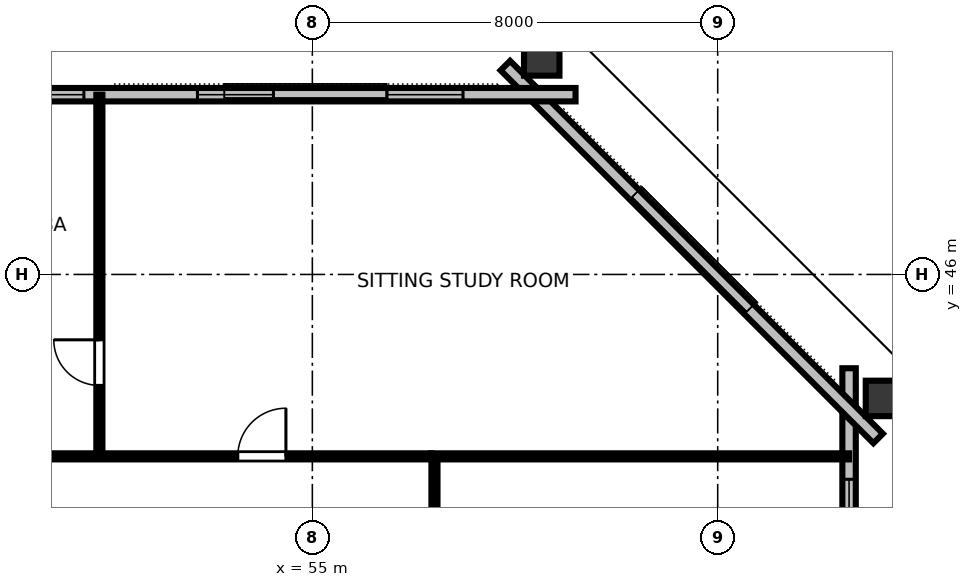
"""IFC4 building model, lengths in metres.
Left out: names, types, materials, properties, quantities, classifications, styles, units other than length and angle.
Written with IfcOpenShell. Run it as: python <this file> out.ifc"""

import sys

from ifc_helpers import new_model, si_unit, direction, frame, frame_2d, origin, origin_2d, place, context, subcontext, project, spatial, rectangle, hollow_rectangle, extrude, element, fill, save


model = new_model("IFC4")
c1 = context("Model", 3, precision=1e-05, world=origin(), true_north=direction((0.0, 1.0)))
c2 = subcontext(c1, "Body", "Model", "MODEL_VIEW")
j1 = project(units=[si_unit("LENGTHUNIT", "METRE"), si_unit("PLANEANGLEUNIT", "RADIAN")], contexts=[c1])
p1 = place(None, origin())
s1 = spatial("IfcSite", under=j1, at=p1, CompositionType="ELEMENT")
p2 = place(p1, origin())
s2 = spatial("IfcBuilding", under=s1, at=p2, CompositionType="ELEMENT")
p3 = place(p2, frame((0.0, 0.0, 220.2)))
s3 = spatial("IfcBuildingStorey", under=s2, at=p3, CompositionType="ELEMENT", Elevation=220.2)
for number, where, z_axis, x_axis in (
    (1, (66.347, 43.554, 0.0), (0.0, 0.0, 1.0), (0.0, 1.0, 0.0)),
    (2, (59.527, 50.348, 0.0), (0.0, 0.0, 1.0), (1.0, 0.0, 0.0)),
):
    element("IfcColumn", number, at=place(p3, frame(where, z_axis=z_axis, x_axis=x_axis)), inside=s3, PredefinedType="COLUMN", context=c2, shape_type="SweptSolid", body=[
        extrude(hollow_rectangle(XDim=0.7, YDim=0.85, WallThickness=0.04, at=origin_2d()), origin(), (0.0, 0.0, 1.0), 3.373),
    ])
p4 = place(p3, frame((65.593, 19.851, 0.0), z_axis=(0.0, 0.0, 1.0), x_axis=(0.0, 1.0, 0.0)))
e3 = element("IfcWall", 3, at=p4, inside=s3, PredefinedType="STANDARD", context=c2, shape_type="SweptSolid", body=[
    extrude(rectangle(XDim=24.298, YDim=0.265, at=frame_2d((12.149, 0.0))), origin(), (0.0, 0.0, 1.0), 3.375),
])
p5 = place(p4, frame((13.499, 0.0, 0.0)))
e4 = element("IfcOpeningElement", 4, at=p5, cuts=e3, PredefinedType="OPENING", context=c2, shape_type="SweptSolid", body=[
    extrude(rectangle(XDim=1.4, YDim=2.15, at=frame_2d((0.7, 1.075))), frame((0.0, 0.142, 0.0), z_axis=(0.0, -1.0, 0.0), x_axis=(1.0, 0.0, 0.0)), (0.0, 0.0, 1.0), 0.285),
])
p6 = place(p4, frame((2.191, 0.0, 0.85)))
e5 = element("IfcOpeningElement", 5, at=p6, cuts=e3, PredefinedType="OPENING", context=c2, shape_type="SweptSolid", body=[
    extrude(rectangle(XDim=1.5, YDim=1.85, at=frame_2d((0.75, 0.925))), frame((0.0, 0.142, 0.0), z_axis=(0.0, -1.0, 0.0), x_axis=(1.0, 0.0, 0.0)), (0.0, 0.0, 1.0), 0.285),
])
p7 = place(p4, frame((5.875, 0.0, 0.85)))
e6 = element("IfcOpeningElement", 6, at=p7, cuts=e3, PredefinedType="OPENING", context=c2, shape_type="SweptSolid", body=[
    extrude(rectangle(XDim=1.5, YDim=1.85, at=frame_2d((0.75, 0.925))), frame((0.0, 0.142, 0.0), z_axis=(0.0, -1.0, 0.0), x_axis=(1.0, 0.0, 0.0)), (0.0, 0.0, 1.0), 0.285),
])
p8 = place(p4, frame((9.558, 0.0, 0.85)))
e7 = element("IfcOpeningElement", 7, at=p8, cuts=e3, PredefinedType="OPENING", context=c2, shape_type="SweptSolid", body=[
    extrude(rectangle(XDim=1.5, YDim=1.85, at=frame_2d((0.75, 0.925))), frame((0.0, 0.142, 0.0), z_axis=(0.0, -1.0, 0.0), x_axis=(1.0, 0.0, 0.0)), (0.0, 0.0, 1.0), 0.285),
])
p9 = place(p4, frame((16.924, 0.0, 0.85)))
e8 = element("IfcOpeningElement", 8, at=p9, cuts=e3, PredefinedType="OPENING", context=c2, shape_type="SweptSolid", body=[
    extrude(rectangle(XDim=1.5, YDim=1.85, at=frame_2d((0.75, 0.925))), frame((0.0, 0.142, 0.0), z_axis=(0.0, -1.0, 0.0), x_axis=(1.0, 0.0, 0.0)), (0.0, 0.0, 1.0), 0.285),
])
p10 = place(p4, frame((20.607, 0.0, 0.85)))
e9 = element("IfcOpeningElement", 9, at=p10, cuts=e3, PredefinedType="OPENING", context=c2, shape_type="SweptSolid", body=[
    extrude(rectangle(XDim=1.5, YDim=1.85, at=frame_2d((0.75, 0.925))), frame((0.0, 0.142, 0.0), z_axis=(0.0, -1.0, 0.0), x_axis=(1.0, 0.0, 0.0)), (0.0, 0.0, 1.0), 0.285),
])
p11 = place(p3, frame((66.167, 42.764, 0.0), z_axis=(0.0, 0.0, 1.0), x_axis=(-0.707106781187, 0.707106781187, 0.0)))
e10 = element("IfcWall", 10, at=p11, inside=s3, PredefinedType="STANDARD", context=c2, shape_type="SweptSolid", body=[
    extrude(rectangle(XDim=10.405, YDim=0.265, at=frame_2d((5.203, 0.0))), origin(), (0.0, 0.0, 1.0), 3.375),
])
p12 = place(p3, frame((60.195, 49.547, 0.0), z_axis=(0.0, 0.0, 1.0), x_axis=(-1.0, 0.0, 0.0)))
e11 = element("IfcWall", 11, at=p12, inside=s3, PredefinedType="STANDARD", context=c2, shape_type="SweptSolid", body=[
    extrude(rectangle(XDim=28.389, YDim=0.265, at=frame_2d((14.195, 0.0))), origin(), (0.0, 0.0, 1.0), 3.375),
])
p13 = place(p12, frame((2.221, 0.0, 0.85)))
e12 = element("IfcOpeningElement", 12, at=p13, cuts=e11, PredefinedType="OPENING", context=c2, shape_type="SweptSolid", body=[
    extrude(rectangle(XDim=1.5, YDim=1.85, at=frame_2d((0.75, 0.925))), frame((0.0, 0.142, 0.0), z_axis=(0.0, -1.0, 0.0), x_axis=(1.0, 0.0, 0.0)), (0.0, 0.0, 1.0), 0.285),
])
p14 = place(p12, frame((5.962, 0.0, 0.85)))
e13 = element("IfcOpeningElement", 13, at=p14, cuts=e11, PredefinedType="OPENING", context=c2, shape_type="SweptSolid", body=[
    extrude(rectangle(XDim=1.5, YDim=1.85, at=frame_2d((0.75, 0.925))), frame((0.0, 0.142, 0.0), z_axis=(0.0, -1.0, 0.0), x_axis=(1.0, 0.0, 0.0)), (0.0, 0.0, 1.0), 0.285),
])
p15 = place(p12, frame((9.703, 0.0, 0.85)))
e14 = element("IfcOpeningElement", 14, at=p15, cuts=e11, PredefinedType="OPENING", context=c2, shape_type="SweptSolid", body=[
    extrude(rectangle(XDim=1.5, YDim=1.85, at=frame_2d((0.75, 0.925))), frame((0.0, 0.142, 0.0), z_axis=(0.0, -1.0, 0.0), x_axis=(1.0, 0.0, 0.0)), (0.0, 0.0, 1.0), 0.285),
])
p16 = place(p12, frame((17.186, 0.0, 0.85)))
e15 = element("IfcOpeningElement", 15, at=p16, cuts=e11, PredefinedType="OPENING", context=c2, shape_type="SweptSolid", body=[
    extrude(rectangle(XDim=1.5, YDim=1.85, at=frame_2d((0.75, 0.925))), frame((0.0, 0.142, 0.0), z_axis=(0.0, -1.0, 0.0), x_axis=(1.0, 0.0, 0.0)), (0.0, 0.0, 1.0), 0.285),
])
p17 = place(p12, frame((20.927, 0.0, 0.85)))
e16 = element("IfcOpeningElement", 16, at=p17, cuts=e11, PredefinedType="OPENING", context=c2, shape_type="SweptSolid", body=[
    extrude(rectangle(XDim=1.5, YDim=1.85, at=frame_2d((0.75, 0.925))), frame((0.0, 0.142, 0.0), z_axis=(0.0, -1.0, 0.0), x_axis=(1.0, 0.0, 0.0)), (0.0, 0.0, 1.0), 0.285),
])
p18 = place(p12, frame((24.668, 0.0, 0.85)))
e17 = element("IfcOpeningElement", 17, at=p18, cuts=e11, PredefinedType="OPENING", context=c2, shape_type="SweptSolid", body=[
    extrude(rectangle(XDim=1.5, YDim=1.85, at=frame_2d((0.75, 0.925))), frame((0.0, 0.142, 0.0), z_axis=(0.0, -1.0, 0.0), x_axis=(1.0, 0.0, 0.0)), (0.0, 0.0, 1.0), 0.285),
])
p19 = place(p3, frame((50.797, 42.41, 0.0), z_axis=(0.0, 0.0, 1.0), x_axis=(0.0, 1.0, 0.0)))
e18 = element("IfcWall", 18, at=p19, inside=s3, PredefinedType="PARTITIONING", context=c2, shape_type="SweptSolid", body=[
    extrude(rectangle(XDim=7.137, YDim=0.12, at=frame_2d((3.569, 0.0))), origin(), (0.0, 0.0, 1.0), 2.655),
])
p20 = place(p19, frame((1.4, 0.0, 0.0)))
e19 = element("IfcOpeningElement", 19, at=p20, cuts=e18, PredefinedType="OPENING", context=c2, shape_type="SweptSolid", body=[
    extrude(rectangle(XDim=0.9, YDim=2.15, at=frame_2d((0.45, 1.075))), frame((0.0, 0.07, 0.0), z_axis=(0.0, -1.0, 0.0), x_axis=(1.0, 0.0, 0.0)), (0.0, 0.0, 1.0), 0.14),
])
p21 = place(p3, frame((47.02, 42.41, 0.0), z_axis=(0.0, 0.0, 1.0), x_axis=(1.0, 0.0, 0.0)))
e20 = element("IfcWall", 20, at=p21, inside=s3, PredefinedType="PARTITIONING", context=c2, shape_type="SweptSolid", body=[
    extrude(rectangle(XDim=10.33, YDim=0.12, at=frame_2d((5.165, 0.0))), origin(), (0.0, 0.0, 1.0), 2.655),
])
p22 = place(p21, frame((1.846, 0.0, 0.0)))
e21 = element("IfcOpeningElement", 21, at=p22, cuts=e20, PredefinedType="OPENING", context=c2, shape_type="SweptSolid", body=[
    extrude(rectangle(XDim=0.95, YDim=2.15, at=frame_2d((0.475, 1.075))), frame((0.0, 0.07, 0.0), z_axis=(0.0, -1.0, 0.0), x_axis=(1.0, 0.0, 0.0)), (0.0, 0.0, 1.0), 0.14),
])
p23 = place(p21, frame((6.509, 0.0, 0.0)))
e22 = element("IfcOpeningElement", 22, at=p23, cuts=e20, PredefinedType="OPENING", context=c2, shape_type="SweptSolid", body=[
    extrude(rectangle(XDim=0.95, YDim=2.15, at=frame_2d((0.475, 1.075))), frame((0.0, 0.07, 0.0), z_axis=(0.0, -1.0, 0.0), x_axis=(1.0, 0.0, 0.0)), (0.0, 0.0, 1.0), 0.14),
])
p24 = place(p3, frame((57.41, 21.65, 0.0), z_axis=(0.0, 0.0, 1.0), x_axis=(0.0, 1.0, 0.0)))
e23 = element("IfcWall", 23, at=p24, inside=s3, PredefinedType="PARTITIONING", context=c2, shape_type="SweptSolid", body=[
    extrude(rectangle(XDim=20.7, YDim=0.12, at=frame_2d((10.35, 0.0))), origin(), (0.0, 0.0, 1.0), 2.655),
])
p25 = place(p24, frame((9.875, 0.0, 0.0)))
e24 = element("IfcOpeningElement", 24, at=p25, cuts=e23, PredefinedType="OPENING", context=c2, shape_type="SweptSolid", body=[
    extrude(rectangle(XDim=0.95, YDim=2.15, at=frame_2d((0.475, 1.075))), frame((0.0, 0.07, 0.0), z_axis=(0.0, -1.0, 0.0), x_axis=(1.0, 0.0, 0.0)), (0.0, 0.0, 1.0), 0.14),
])
p26 = place(p3, frame((57.35, 42.41, 0.0), z_axis=(0.0, 0.0, 1.0), x_axis=(1.0, 0.0, 0.0)))
e25 = element("IfcWall", 25, at=p26, inside=s3, PredefinedType="PARTITIONING", context=c2, shape_type="SweptSolid", body=[
    extrude(rectangle(XDim=8.243, YDim=0.12, at=frame_2d((4.121, 0.0))), origin(), (0.0, 0.0, 1.0), 2.655),
])
p27 = place(p10, origin())
e26 = element("IfcWindow", 26, at=p27, inside=s3, PartitioningType="SINGLE_PANEL", PredefinedType="WINDOW", context=c2, shape_type="SweptSolid", body=[
    extrude(rectangle(XDim=1.5, YDim=1.85, at=frame_2d((0.75, 0.925))), frame((0.0, 0.03, 0.0), z_axis=(0.0, -1.0, 0.0), x_axis=(1.0, 0.0, 0.0)), (0.0, 0.0, 1.0), 0.06),
])
fill(e9, e26)
p28 = place(p13, origin())
e27 = element("IfcWindow", 27, at=p28, inside=s3, PartitioningType="SINGLE_PANEL", PredefinedType="WINDOW", context=c2, shape_type="SweptSolid", body=[
    extrude(rectangle(XDim=1.5, YDim=1.85, at=frame_2d((0.75, 0.925))), frame((0.0, 0.03, 0.0), z_axis=(0.0, -1.0, 0.0), x_axis=(1.0, 0.0, 0.0)), (0.0, 0.0, 1.0), 0.06),
])
fill(e12, e27)
p29 = place(p14, origin())
e28 = element("IfcWindow", 28, at=p29, inside=s3, PartitioningType="SINGLE_PANEL", PredefinedType="WINDOW", context=c2, shape_type="SweptSolid", body=[
    extrude(rectangle(XDim=1.5, YDim=1.85, at=frame_2d((0.75, 0.925))), frame((0.0, 0.03, 0.0), z_axis=(0.0, -1.0, 0.0), x_axis=(1.0, 0.0, 0.0)), (0.0, 0.0, 1.0), 0.06),
])
fill(e13, e28)
p30 = place(p15, origin())
e29 = element("IfcWindow", 29, at=p30, inside=s3, PartitioningType="SINGLE_PANEL", PredefinedType="WINDOW", context=c2, shape_type="SweptSolid", body=[
    extrude(rectangle(XDim=1.5, YDim=1.85, at=frame_2d((0.75, 0.925))), frame((0.0, 0.03, 0.0), z_axis=(0.0, -1.0, 0.0), x_axis=(1.0, 0.0, 0.0)), (0.0, 0.0, 1.0), 0.06),
])
fill(e14, e29)
p31 = place(p20, origin())
e30 = element("IfcDoor", 30, at=p31, inside=s3, OperationType="SINGLE_SWING_RIGHT", PredefinedType="DOOR", context=c2, shape_type="SweptSolid", body=[
    extrude(rectangle(XDim=0.9, YDim=2.15, at=frame_2d((0.45, 1.075))), frame((0.0, 0.025, 0.0), z_axis=(0.0, -1.0, 0.0), x_axis=(1.0, 0.0, 0.0)), (0.0, 0.0, 1.0), 0.05),
])
fill(e19, e30)
p32 = place(p23, origin())
e31 = element("IfcDoor", 31, at=p32, inside=s3, OperationType="SINGLE_SWING_RIGHT", PredefinedType="DOOR", context=c2, shape_type="SweptSolid", body=[
    extrude(rectangle(XDim=0.95, YDim=2.15, at=frame_2d((0.475, 1.075))), frame((0.0, 0.025, 0.0), z_axis=(0.0, -1.0, 0.0), x_axis=(1.0, 0.0, 0.0)), (0.0, 0.0, 1.0), 0.05),
])
fill(e22, e31)
save(model, sys.argv[1])
